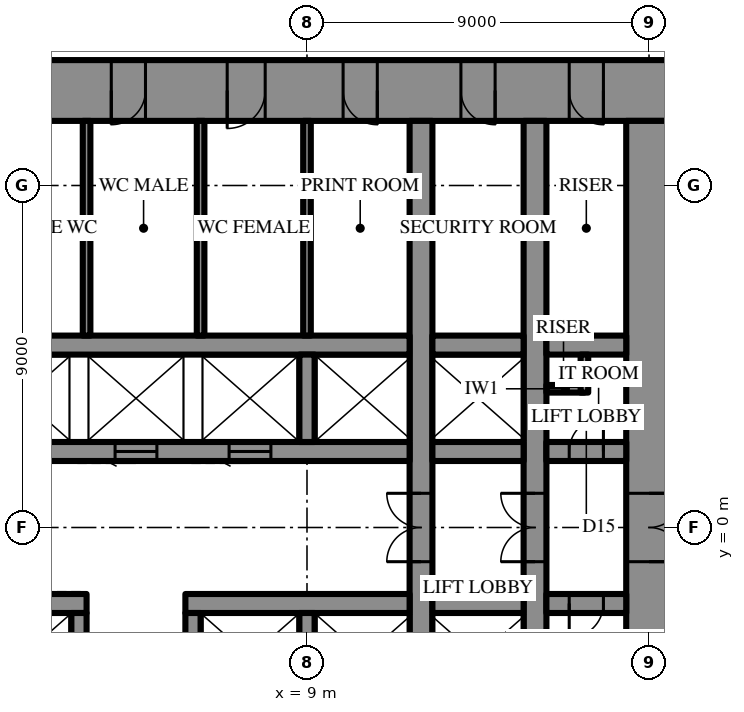
"""IFC4 building model, lengths in metres.
Left out: names, types, materials, properties, quantities, classifications, styles, units other than length and angle.
Written with IfcOpenShell. Run it as: python <this file> out.ifc"""

import sys

from ifc_helpers import new_model, si_unit, direction, frame, frame_2d, origin, place, context, subcontext, project, spatial, rectangle, extrude, element, fill, save


model = new_model("IFC4")
c1 = context("Model", 3, precision=1e-05, world=origin(), true_north=direction((0.0, 1.0)))
c2 = subcontext(c1, "Body", "Model", "MODEL_VIEW")
j1 = project(units=[si_unit("LENGTHUNIT", "METRE"), si_unit("PLANEANGLEUNIT", "RADIAN")], contexts=[c1])
p1 = place(None, origin())
s1 = spatial("IfcSite", under=j1, at=p1, CompositionType="ELEMENT")
p2 = place(p1, origin())
s2 = spatial("IfcBuilding", under=s1, at=p2, CompositionType="ELEMENT")
p3 = place(p2, frame((0.0, 0.0, 123.7)))
s3 = spatial("IfcBuildingStorey", under=s2, at=p3, CompositionType="ELEMENT", Elevation=123.7)
p4 = place(p3, frame((-18.6, 11.5, 0.0), z_axis=(0.0, 0.0, 1.0), x_axis=(1.0, 0.0, 0.0)))
e1 = element("IfcWall", 1, at=p4, inside=s3, PredefinedType="SHEAR", context=c2, shape_type="SweptSolid", body=[
    extrude(rectangle(XDim=37.2, YDim=1.6, at=frame_2d((18.6, 0.0))), origin(), (0.0, 0.0, 1.0), 4.2),
])
p5 = place(p4, frame((19.45, 0.0, 0.0)))
e2 = element("IfcOpeningElement", 2, at=p5, cuts=e1, PredefinedType="OPENING", context=c2, shape_type="SweptSolid", body=[
    extrude(rectangle(XDim=0.9, YDim=2.2, at=frame_2d((0.45, 1.1))), frame((0.0, 0.81, 0.0), z_axis=(0.0, -1.0, 0.0), x_axis=(1.0, 0.0, 0.0)), (0.0, 0.0, 1.0), 1.62),
])
p6 = place(p4, frame((22.45, 0.0, 0.0)))
e3 = element("IfcOpeningElement", 3, at=p6, cuts=e1, PredefinedType="OPENING", context=c2, shape_type="SweptSolid", body=[
    extrude(rectangle(XDim=0.9, YDim=2.2, at=frame_2d((0.45, 1.1))), frame((0.0, 0.81, 0.0), z_axis=(0.0, -1.0, 0.0), x_axis=(1.0, 0.0, 0.0)), (0.0, 0.0, 1.0), 1.62),
])
p7 = place(p4, frame((25.5, 0.0, 0.0)))
e4 = element("IfcOpeningElement", 4, at=p7, cuts=e1, PredefinedType="OPENING", context=c2, shape_type="SweptSolid", body=[
    extrude(rectangle(XDim=1.0, YDim=2.2, at=frame_2d((0.5, 1.1))), frame((0.0, 0.81, 0.0), z_axis=(0.0, -1.0, 0.0), x_axis=(1.0, 0.0, 0.0)), (0.0, 0.0, 1.0), 1.62),
])
p8 = place(p4, frame((1.8, 0.0, 0.0)))
e5 = element("IfcOpeningElement", 5, at=p8, cuts=e1, PredefinedType="OPENING", context=c2, shape_type="SweptSolid", body=[
    extrude(rectangle(XDim=0.9, YDim=2.2, at=frame_2d((0.45, 1.1))), frame((0.0, 0.81, 0.0), z_axis=(0.0, -1.0, 0.0), x_axis=(1.0, 0.0, 0.0)), (0.0, 0.0, 1.0), 1.62),
])
p9 = place(p4, frame((4.65, 0.0, 0.0)))
e6 = element("IfcOpeningElement", 6, at=p9, cuts=e1, PredefinedType="OPENING", context=c2, shape_type="SweptSolid", body=[
    extrude(rectangle(XDim=0.9, YDim=2.2, at=frame_2d((0.45, 1.1))), frame((0.0, 0.81, 0.0), z_axis=(0.0, -1.0, 0.0), x_axis=(1.0, 0.0, 0.0)), (0.0, 0.0, 1.0), 1.62),
])
p10 = place(p4, frame((7.75, 0.0, 0.0)))
e7 = element("IfcOpeningElement", 7, at=p10, cuts=e1, PredefinedType="OPENING", context=c2, shape_type="SweptSolid", body=[
    extrude(rectangle(XDim=0.9, YDim=2.2, at=frame_2d((0.45, 1.1))), frame((0.0, 0.81, 0.0), z_axis=(0.0, -1.0, 0.0), x_axis=(1.0, 0.0, 0.0)), (0.0, 0.0, 1.0), 1.62),
])
p11 = place(p4, frame((28.55, 0.0, 0.0)))
e8 = element("IfcOpeningElement", 8, at=p11, cuts=e1, PredefinedType="OPENING", context=c2, shape_type="SweptSolid", body=[
    extrude(rectangle(XDim=0.9, YDim=2.2, at=frame_2d((0.45, 1.1))), frame((0.0, 0.81, 0.0), z_axis=(0.0, -1.0, 0.0), x_axis=(1.0, 0.0, 0.0)), (0.0, 0.0, 1.0), 1.62),
])
p12 = place(p4, frame((31.65, 0.0, 0.0)))
e9 = element("IfcOpeningElement", 9, at=p12, cuts=e1, PredefinedType="OPENING", context=c2, shape_type="SweptSolid", body=[
    extrude(rectangle(XDim=0.9, YDim=2.2, at=frame_2d((0.45, 1.1))), frame((0.0, 0.81, 0.0), z_axis=(0.0, -1.0, 0.0), x_axis=(1.0, 0.0, 0.0)), (0.0, 0.0, 1.0), 1.62),
])
p13 = place(p4, frame((34.5, 0.0, 0.0)))
e10 = element("IfcOpeningElement", 10, at=p13, cuts=e1, PredefinedType="OPENING", context=c2, shape_type="SweptSolid", body=[
    extrude(rectangle(XDim=0.9, YDim=2.2, at=frame_2d((0.45, 1.1))), frame((0.0, 0.81, 0.0), z_axis=(0.0, -1.0, 0.0), x_axis=(1.0, 0.0, 0.0)), (0.0, 0.0, 1.0), 1.62),
])
p14 = place(p3, frame((18.0, -10.7, 0.0), z_axis=(0.0, 0.0, 1.0), x_axis=(0.0, 1.0, 0.0)))
e11 = element("IfcWall", 11, at=p14, inside=s3, PredefinedType="SHEAR", context=c2, shape_type="SweptSolid", body=[
    extrude(rectangle(XDim=21.4, YDim=1.2, at=frame_2d((10.7, 0.0))), origin(), (0.0, 0.0, 1.0), 4.2),
])
p15 = place(p14, frame((9.8, 0.0, 0.0)))
e12 = element("IfcOpeningElement", 12, at=p15, cuts=e11, PredefinedType="OPENING", context=c2, shape_type="SweptSolid", body=[
    extrude(rectangle(XDim=1.8, YDim=2.4, at=frame_2d((0.9, 1.2))), frame((0.0, 0.61, 0.0), z_axis=(0.0, -1.0, 0.0), x_axis=(1.0, 0.0, 0.0)), (0.0, 0.0, 1.0), 1.22),
])
p16 = place(p3, frame((12.0, -10.7, 0.0), z_axis=(0.0, 0.0, 1.0), x_axis=(0.0, 1.0, 0.0)))
e13 = element("IfcWall", 13, at=p16, inside=s3, PredefinedType="SHEAR", context=c2, shape_type="SweptSolid", body=[
    extrude(rectangle(XDim=21.4, YDim=0.6, at=frame_2d((10.7, 0.0))), origin(), (0.0, 0.0, 1.0), 4.2),
])
p17 = place(p16, frame((9.8, 0.0, 0.0)))
e14 = element("IfcOpeningElement", 14, at=p17, cuts=e13, PredefinedType="OPENING", context=c2, shape_type="SweptSolid", body=[
    extrude(rectangle(XDim=1.8, YDim=2.4, at=frame_2d((0.9, 1.2))), frame((0.0, 0.31, 0.0), z_axis=(0.0, -1.0, 0.0), x_axis=(1.0, 0.0, 0.0)), (0.0, 0.0, 1.0), 0.62),
])
p18 = place(p3, frame((15.0, -10.7, 0.0), z_axis=(0.0, 0.0, 1.0), x_axis=(0.0, 1.0, 0.0)))
e15 = element("IfcWall", 15, at=p18, inside=s3, PredefinedType="SHEAR", context=c2, shape_type="SweptSolid", body=[
    extrude(rectangle(XDim=21.4, YDim=0.6, at=frame_2d((10.7, 0.0))), origin(), (0.0, 0.0, 1.0), 4.2),
])
p19 = place(p18, frame((9.8, 0.0, 0.0)))
e16 = element("IfcOpeningElement", 16, at=p19, cuts=e15, PredefinedType="OPENING", context=c2, shape_type="SweptSolid", body=[
    extrude(rectangle(XDim=1.8, YDim=2.4, at=frame_2d((0.9, 1.2))), frame((0.0, 0.31, 0.0), z_axis=(0.0, -1.0, 0.0), x_axis=(1.0, 0.0, 0.0)), (0.0, 0.0, 1.0), 0.62),
])
p20 = place(p3, frame((-3.2, 2.0, 0.0), z_axis=(0.0, 0.0, 1.0), x_axis=(1.0, 0.0, 0.0)))
e17 = element("IfcWall", 17, at=p20, inside=s3, PredefinedType="SHEAR", context=c2, shape_type="SweptSolid", body=[
    extrude(rectangle(XDim=14.9, YDim=0.5, at=frame_2d((7.45, 0.0))), origin(), (0.0, 0.0, 1.0), 4.2),
])
p21 = place(p20, frame((1.15, 0.0, 0.0)))
e18 = element("IfcOpeningElement", 18, at=p21, cuts=e17, PredefinedType="OPENING", context=c2, shape_type="SweptSolid", body=[
    extrude(rectangle(XDim=1.1, YDim=2.2, at=frame_2d((0.55, 1.1))), frame((0.0, 0.26, 0.0), z_axis=(0.0, -1.0, 0.0), x_axis=(1.0, 0.0, 0.0)), (0.0, 0.0, 1.0), 0.52),
])
p22 = place(p20, frame((4.15, 0.0, 0.0)))
e19 = element("IfcOpeningElement", 19, at=p22, cuts=e17, PredefinedType="OPENING", context=c2, shape_type="SweptSolid", body=[
    extrude(rectangle(XDim=1.1, YDim=2.2, at=frame_2d((0.55, 1.1))), frame((0.0, 0.26, 0.0), z_axis=(0.0, -1.0, 0.0), x_axis=(1.0, 0.0, 0.0)), (0.0, 0.0, 1.0), 0.52),
])
p23 = place(p20, frame((7.15, 0.0, 0.0)))
e20 = element("IfcOpeningElement", 20, at=p23, cuts=e17, PredefinedType="OPENING", context=c2, shape_type="SweptSolid", body=[
    extrude(rectangle(XDim=1.1, YDim=2.2, at=frame_2d((0.55, 1.1))), frame((0.0, 0.26, 0.0), z_axis=(0.0, -1.0, 0.0), x_axis=(1.0, 0.0, 0.0)), (0.0, 0.0, 1.0), 0.52),
])
p24 = place(p20, frame((10.15, 0.0, 0.0)))
e21 = element("IfcOpeningElement", 21, at=p24, cuts=e17, PredefinedType="OPENING", context=c2, shape_type="SweptSolid", body=[
    extrude(rectangle(XDim=1.1, YDim=2.2, at=frame_2d((0.55, 1.1))), frame((0.0, 0.26, 0.0), z_axis=(0.0, -1.0, 0.0), x_axis=(1.0, 0.0, 0.0)), (0.0, 0.0, 1.0), 0.52),
])
p25 = place(p3, frame((12.3, 2.0, 0.0), z_axis=(0.0, 0.0, 1.0), x_axis=(1.0, 0.0, 0.0)))
e22 = element("IfcWall", 22, at=p25, inside=s3, PredefinedType="SHEAR", context=c2, shape_type="SweptSolid", body=[
    extrude(rectangle(XDim=2.4, YDim=0.5, at=frame_2d((1.2, 0.0))), origin(), (0.0, 0.0, 1.0), 4.2),
])
p26 = place(p3, frame((15.3, 2.0, 0.0), z_axis=(0.0, 0.0, 1.0), x_axis=(1.0, 0.0, 0.0)))
e23 = element("IfcWall", 23, at=p26, inside=s3, PredefinedType="SHEAR", context=c2, shape_type="SweptSolid", body=[
    extrude(rectangle(XDim=2.1, YDim=0.5, at=frame_2d((1.05, 0.0))), origin(), (0.0, 0.0, 1.0), 4.2),
])
p27 = place(p26, frame((0.6, 0.0, 0.0)))
e24 = element("IfcOpeningElement", 24, at=p27, cuts=e23, PredefinedType="OPENING", context=c2, shape_type="SweptSolid", body=[
    extrude(rectangle(XDim=0.9, YDim=2.2, at=frame_2d((0.45, 1.1))), frame((0.0, 0.26, 0.0), z_axis=(0.0, -1.0, 0.0), x_axis=(1.0, 0.0, 0.0)), (0.0, 0.0, 1.0), 0.52),
])
p28 = place(p3, frame((-11.7, 4.8, 0.0), z_axis=(0.0, 0.0, 1.0), x_axis=(1.0, 0.0, 0.0)))
e25 = element("IfcWall", 25, at=p28, inside=s3, PredefinedType="SHEAR", context=c2, shape_type="SweptSolid", body=[
    extrude(rectangle(XDim=23.4, YDim=0.5, at=frame_2d((11.7, 0.0))), origin(), (0.0, 0.0, 1.0), 4.2),
])
p29 = place(p28, frame((6.6, 0.0, 0.0)))
e26 = element("IfcOpeningElement", 26, at=p29, cuts=e25, PredefinedType="OPENING", context=c2, shape_type="SweptSolid", body=[
    extrude(rectangle(XDim=1.2, YDim=2.2, at=frame_2d((0.6, 1.1))), frame((0.0, 0.26, 0.0), z_axis=(0.0, -1.0, 0.0), x_axis=(1.0, 0.0, 0.0)), (0.0, 0.0, 1.0), 0.52),
])
p30 = place(p28, frame((3.6, 0.0, 0.0)))
e27 = element("IfcOpeningElement", 27, at=p30, cuts=e25, PredefinedType="OPENING", context=c2, shape_type="SweptSolid", body=[
    extrude(rectangle(XDim=1.2, YDim=2.2, at=frame_2d((0.6, 1.1))), frame((0.0, 0.26, 0.0), z_axis=(0.0, -1.0, 0.0), x_axis=(1.0, 0.0, 0.0)), (0.0, 0.0, 1.0), 0.52),
])
p31 = place(p3, frame((12.3, 4.8, 0.0), z_axis=(0.0, 0.0, 1.0), x_axis=(1.0, 0.0, 0.0)))
e28 = element("IfcWall", 28, at=p31, inside=s3, PredefinedType="SHEAR", context=c2, shape_type="SweptSolid", body=[
    extrude(rectangle(XDim=2.4, YDim=0.5, at=frame_2d((1.2, 0.0))), origin(), (0.0, 0.0, 1.0), 4.2),
])
p32 = place(p3, frame((15.3, 4.8, 0.0), z_axis=(0.0, 0.0, 1.0), x_axis=(1.0, 0.0, 0.0)))
e29 = element("IfcWall", 29, at=p32, inside=s3, PredefinedType="SHEAR", context=c2, shape_type="SweptSolid", body=[
    extrude(rectangle(XDim=2.1, YDim=0.5, at=frame_2d((1.05, 0.0))), origin(), (0.0, 0.0, 1.0), 4.2),
])
p33 = place(p3, frame((9.0, 2.25, 0.0), z_axis=(0.0, 0.0, 1.0), x_axis=(0.0, 1.0, 0.0)))
e30 = element("IfcWall", 30, at=p33, inside=s3, PredefinedType="SHEAR", context=c2, shape_type="SweptSolid", body=[
    extrude(rectangle(XDim=2.3, YDim=0.4, at=frame_2d((1.15, 0.0))), origin(), (0.0, 0.0, 1.0), 4.2),
])
p34 = place(p3, frame((17.4, -2.0, 0.0), z_axis=(0.0, 0.0, 1.0), x_axis=(-1.0, 0.0, 0.0)))
e31 = element("IfcWall", 31, at=p34, inside=s3, PredefinedType="SHEAR", context=c2, shape_type="SweptSolid", body=[
    extrude(rectangle(XDim=2.1, YDim=0.5, at=frame_2d((1.05, 0.0))), origin(), (0.0, 0.0, 1.0), 4.2),
])
p35 = place(p34, frame((0.6, 0.0, 0.0)))
e32 = element("IfcOpeningElement", 32, at=p35, cuts=e31, PredefinedType="OPENING", context=c2, shape_type="SweptSolid", body=[
    extrude(rectangle(XDim=0.9, YDim=2.2, at=frame_2d((0.45, 1.1))), frame((0.0, 0.26, 0.0), z_axis=(0.0, -1.0, 0.0), x_axis=(1.0, 0.0, 0.0)), (0.0, 0.0, 1.0), 0.52),
])
p36 = place(p3, frame((14.7, -2.0, 0.0), z_axis=(0.0, 0.0, 1.0), x_axis=(-1.0, 0.0, 0.0)))
e33 = element("IfcWall", 33, at=p36, inside=s3, PredefinedType="SHEAR", context=c2, shape_type="SweptSolid", body=[
    extrude(rectangle(XDim=2.4, YDim=0.5, at=frame_2d((1.2, 0.0))), origin(), (0.0, 0.0, 1.0), 4.2),
])
p37 = place(p3, frame((11.7, -2.0, 0.0), z_axis=(0.0, 0.0, 1.0), x_axis=(-1.0, 0.0, 0.0)))
e34 = element("IfcWall", 34, at=p37, inside=s3, PredefinedType="SHEAR", context=c2, shape_type="SweptSolid", body=[
    extrude(rectangle(XDim=5.9, YDim=0.5, at=frame_2d((2.95, 0.0))), origin(), (0.0, 0.0, 1.0), 4.2),
])
p38 = place(p3, frame((3.2, -2.0, 0.0), z_axis=(0.0, 0.0, 1.0), x_axis=(-1.0, 0.0, 0.0)))
e35 = element("IfcWall", 35, at=p38, inside=s3, PredefinedType="SHEAR", context=c2, shape_type="SweptSolid", body=[
    extrude(rectangle(XDim=14.9, YDim=0.5, at=frame_2d((7.45, 0.0))), origin(), (0.0, 0.0, 1.0), 4.2),
])
p39 = place(p38, frame((1.15, 0.0, 0.0)))
e36 = element("IfcOpeningElement", 36, at=p39, cuts=e35, PredefinedType="OPENING", context=c2, shape_type="SweptSolid", body=[
    extrude(rectangle(XDim=1.1, YDim=2.2, at=frame_2d((0.55, 1.1))), frame((0.0, 0.26, 0.0), z_axis=(0.0, -1.0, 0.0), x_axis=(1.0, 0.0, 0.0)), (0.0, 0.0, 1.0), 0.52),
])
p40 = place(p38, frame((4.15, 0.0, 0.0)))
e37 = element("IfcOpeningElement", 37, at=p40, cuts=e35, PredefinedType="OPENING", context=c2, shape_type="SweptSolid", body=[
    extrude(rectangle(XDim=1.1, YDim=2.2, at=frame_2d((0.55, 1.1))), frame((0.0, 0.26, 0.0), z_axis=(0.0, -1.0, 0.0), x_axis=(1.0, 0.0, 0.0)), (0.0, 0.0, 1.0), 0.52),
])
p41 = place(p38, frame((7.15, 0.0, 0.0)))
e38 = element("IfcOpeningElement", 38, at=p41, cuts=e35, PredefinedType="OPENING", context=c2, shape_type="SweptSolid", body=[
    extrude(rectangle(XDim=1.1, YDim=2.2, at=frame_2d((0.55, 1.1))), frame((0.0, 0.26, 0.0), z_axis=(0.0, -1.0, 0.0), x_axis=(1.0, 0.0, 0.0)), (0.0, 0.0, 1.0), 0.52),
])
p42 = place(p38, frame((10.15, 0.0, 0.0)))
e39 = element("IfcOpeningElement", 39, at=p42, cuts=e35, PredefinedType="OPENING", context=c2, shape_type="SweptSolid", body=[
    extrude(rectangle(XDim=1.1, YDim=2.2, at=frame_2d((0.55, 1.1))), frame((0.0, 0.26, 0.0), z_axis=(0.0, -1.0, 0.0), x_axis=(1.0, 0.0, 0.0)), (0.0, 0.0, 1.0), 0.52),
])
for number, where, z_axis, x_axis in (
    (40, (9.0, -2.25, 0.0), (0.0, 0.0, 1.0), (0.0, -1.0, 0.0)),
    (41, (6.0, -2.25, 0.0), (0.0, 0.0, 1.0), (0.0, -1.0, 0.0)),
    (42, (3.0, -2.25, 0.0), (0.0, 0.0, 1.0), (0.0, -1.0, 0.0)),
):
    element("IfcWall", number, at=place(p3, frame(where, z_axis=z_axis, x_axis=x_axis)), inside=s3, PredefinedType="SHEAR", context=c2, shape_type="SweptSolid", body=[
        extrude(rectangle(XDim=2.3, YDim=0.4, at=frame_2d((1.15, 0.0))), origin(), (0.0, 0.0, 1.0), 4.2),
    ])
for number, where, z_axis, x_axis in (
    (43, (9.0, 5.05, 0.0), (0.0, 0.0, 1.0), (0.0, 1.0, 0.0)),
    (44, (3.2, 5.05, 0.0), (0.0, 0.0, 1.0), (0.0, 1.0, 0.0)),
    (45, (6.2, 5.05, 0.0), (0.0, 0.0, 1.0), (0.0, 1.0, 0.0)),
):
    element("IfcWall", number, at=place(p3, frame(where, z_axis=z_axis, x_axis=x_axis)), inside=s3, PredefinedType="PARTITIONING", context=c2, shape_type="SweptSolid", body=[
        extrude(rectangle(XDim=5.65, YDim=0.2, at=frame_2d((2.825, 0.0))), origin(), (0.0, 0.0, 1.0), 4.0),
    ])
for number, where, z_axis, x_axis in (
    (46, (15.3, 3.65, 0.0), (0.0, 0.0, 1.0), (1.0, 0.0, 0.0)),
    (47, (16.3, 3.55, 0.0), (0.0, 0.0, 1.0), (0.0, 1.0, 0.0)),
):
    element("IfcWall", number, at=place(p3, frame(where, z_axis=z_axis, x_axis=x_axis)), inside=s3, PredefinedType="PARTITIONING", context=c2, shape_type="SweptSolid", body=[
        extrude(rectangle(XDim=1.0, YDim=0.2, at=frame_2d((0.5, 0.0))), origin(), (0.0, 0.0, 1.0), 4.0),
    ])
p43 = place(p15, frame((1.8, 0.0, 0.0), z_axis=(0.0, 0.0, 1.0), x_axis=(-1.0, 0.0, 0.0)))
e48 = element("IfcDoor", 48, at=p43, inside=s3, OperationType="DOUBLE_DOOR_SINGLE_SWING", PredefinedType="DOOR", context=c2, shape_type="SweptSolid", body=[
    extrude(rectangle(XDim=1.8, YDim=2.4, at=frame_2d((0.9, 1.2))), frame((0.0, 0.025, 0.0), z_axis=(0.0, -1.0, 0.0), x_axis=(1.0, 0.0, 0.0)), (0.0, 0.0, 1.0), 0.05),
])
fill(e12, e48)
p44 = place(p6, frame((0.9, 0.0, 0.0), z_axis=(0.0, 0.0, 1.0), x_axis=(-1.0, 0.0, 0.0)))
e49 = element("IfcDoor", 49, at=p44, inside=s3, OperationType="SINGLE_SWING_LEFT", PredefinedType="DOOR", context=c2, shape_type="SweptSolid", body=[
    extrude(rectangle(XDim=0.9, YDim=2.2, at=frame_2d((0.45, 1.1))), frame((0.0, 0.025, 0.0), z_axis=(0.0, -1.0, 0.0), x_axis=(1.0, 0.0, 0.0)), (0.0, 0.0, 1.0), 0.05),
])
fill(e3, e49)
p45 = place(p7, frame((1.0, 0.0, 0.0), z_axis=(0.0, 0.0, 1.0), x_axis=(-1.0, 0.0, 0.0)))
e50 = element("IfcDoor", 50, at=p45, inside=s3, OperationType="SINGLE_SWING_LEFT", PredefinedType="DOOR", context=c2, shape_type="SweptSolid", body=[
    extrude(rectangle(XDim=1.0, YDim=2.2, at=frame_2d((0.5, 1.1))), frame((0.0, 0.025, 0.0), z_axis=(0.0, -1.0, 0.0), x_axis=(1.0, 0.0, 0.0)), (0.0, 0.0, 1.0), 0.05),
])
fill(e4, e50)
p46 = place(p11, frame((0.9, 0.0, 0.0), z_axis=(0.0, 0.0, 1.0), x_axis=(-1.0, 0.0, 0.0)))
e51 = element("IfcDoor", 51, at=p46, inside=s3, OperationType="SINGLE_SWING_RIGHT", PredefinedType="DOOR", context=c2, shape_type="SweptSolid", body=[
    extrude(rectangle(XDim=0.9, YDim=2.2, at=frame_2d((0.45, 1.1))), frame((0.0, 0.025, 0.0), z_axis=(0.0, -1.0, 0.0), x_axis=(1.0, 0.0, 0.0)), (0.0, 0.0, 1.0), 0.05),
])
fill(e8, e51)
p47 = place(p12, frame((0.9, 0.0, 0.0), z_axis=(0.0, 0.0, 1.0), x_axis=(-1.0, 0.0, 0.0)))
e52 = element("IfcDoor", 52, at=p47, inside=s3, OperationType="SINGLE_SWING_RIGHT", PredefinedType="DOOR", context=c2, shape_type="SweptSolid", body=[
    extrude(rectangle(XDim=0.9, YDim=2.2, at=frame_2d((0.45, 1.1))), frame((0.0, 0.025, 0.0), z_axis=(0.0, -1.0, 0.0), x_axis=(1.0, 0.0, 0.0)), (0.0, 0.0, 1.0), 0.05),
])
fill(e9, e52)
p48 = place(p13, frame((0.9, 0.0, 0.0), z_axis=(0.0, 0.0, 1.0), x_axis=(-1.0, 0.0, 0.0)))
e53 = element("IfcDoor", 53, at=p48, inside=s3, OperationType="SINGLE_SWING_RIGHT", PredefinedType="DOOR", context=c2, shape_type="SweptSolid", body=[
    extrude(rectangle(XDim=0.9, YDim=2.2, at=frame_2d((0.45, 1.1))), frame((0.0, 0.025, 0.0), z_axis=(0.0, -1.0, 0.0), x_axis=(1.0, 0.0, 0.0)), (0.0, 0.0, 1.0), 0.05),
])
fill(e10, e53)
p49 = place(p27, origin())
e54 = element("IfcDoor", 54, at=p49, inside=s3, OperationType="SINGLE_SWING_LEFT", PredefinedType="DOOR", context=c2, shape_type="SweptSolid", body=[
    extrude(rectangle(XDim=0.9, YDim=2.2, at=frame_2d((0.45, 1.1))), frame((0.0, 0.025, 0.0), z_axis=(0.0, -1.0, 0.0), x_axis=(1.0, 0.0, 0.0)), (0.0, 0.0, 1.0), 0.05),
])
fill(e24, e54)
p50 = place(p35, origin())
e55 = element("IfcDoor", 55, at=p50, inside=s3, OperationType="SINGLE_SWING_LEFT", PredefinedType="DOOR", context=c2, shape_type="SweptSolid", body=[
    extrude(rectangle(XDim=0.9, YDim=2.2, at=frame_2d((0.45, 1.1))), frame((0.0, 0.025, 0.0), z_axis=(0.0, -1.0, 0.0), x_axis=(1.0, 0.0, 0.0)), (0.0, 0.0, 1.0), 0.05),
])
fill(e32, e55)
p51 = place(p17, origin())
e56 = element("IfcDoor", 56, at=p51, inside=s3, OperationType="DOUBLE_DOOR_SINGLE_SWING", PredefinedType="DOOR", context=c2, shape_type="SweptSolid", body=[
    extrude(rectangle(XDim=1.8, YDim=2.4, at=frame_2d((0.9, 1.2))), frame((0.0, 0.025, 0.0), z_axis=(0.0, -1.0, 0.0), x_axis=(1.0, 0.0, 0.0)), (0.0, 0.0, 1.0), 0.05),
])
fill(e14, e56)
p52 = place(p19, origin())
e57 = element("IfcDoor", 57, at=p52, inside=s3, OperationType="DOUBLE_DOOR_SINGLE_SWING", PredefinedType="DOOR", context=c2, shape_type="SweptSolid", body=[
    extrude(rectangle(XDim=1.8, YDim=2.4, at=frame_2d((0.9, 1.2))), frame((0.0, 0.025, 0.0), z_axis=(0.0, -1.0, 0.0), x_axis=(1.0, 0.0, 0.0)), (0.0, 0.0, 1.0), 0.05),
])
fill(e16, e57)
p53 = place(p23, frame((1.1, 0.0, 0.0), z_axis=(0.0, 0.0, 1.0), x_axis=(-1.0, 0.0, 0.0)))
e58 = element("IfcDoor", 58, at=p53, inside=s3, OperationType="SLIDING_TO_LEFT", PredefinedType="DOOR", context=c2, shape_type="SweptSolid", body=[
    extrude(rectangle(XDim=1.1, YDim=2.2, at=frame_2d((0.55, 1.1))), frame((0.0, 0.025, 0.0), z_axis=(0.0, -1.0, 0.0), x_axis=(1.0, 0.0, 0.0)), (0.0, 0.0, 1.0), 0.05),
])
fill(e20, e58)
p54 = place(p24, frame((1.1, 0.0, 0.0), z_axis=(0.0, 0.0, 1.0), x_axis=(-1.0, 0.0, 0.0)))
e59 = element("IfcDoor", 59, at=p54, inside=s3, OperationType="SLIDING_TO_LEFT", PredefinedType="DOOR", context=c2, shape_type="SweptSolid", body=[
    extrude(rectangle(XDim=1.1, YDim=2.2, at=frame_2d((0.55, 1.1))), frame((0.0, 0.025, 0.0), z_axis=(0.0, -1.0, 0.0), x_axis=(1.0, 0.0, 0.0)), (0.0, 0.0, 1.0), 0.05),
])
fill(e21, e59)
save(model, sys.argv[1])
